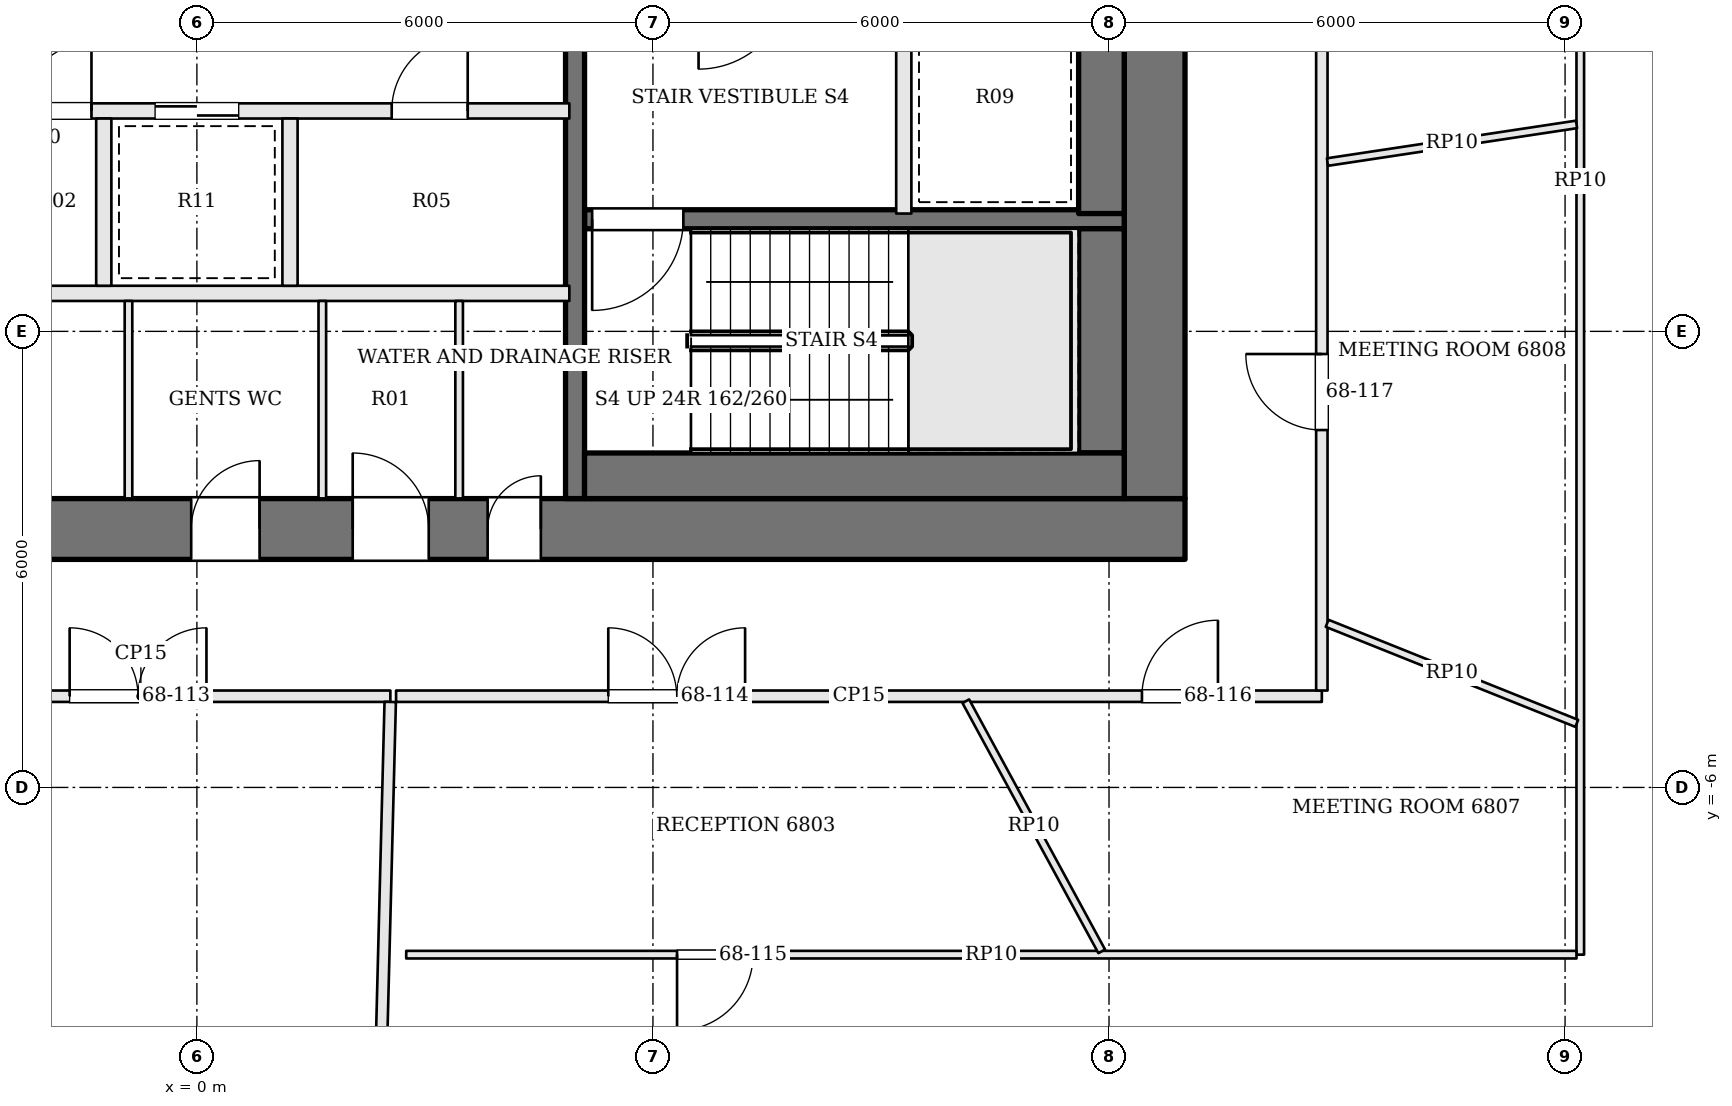
"""IFC4 building model, lengths in metres.
Left out: names, types, materials, properties, quantities, classifications, styles, units other than length and angle.
Written with IfcOpenShell. Run it as: python <this file> out.ifc"""

import sys

from ifc_helpers import new_model, si_unit, direction, frame, frame_2d, origin, place, context, subcontext, project, spatial, rectangle, extrude, element, fill, save


model = new_model("IFC4")
c1 = context("Model", 3, precision=1e-05, world=origin(), true_north=direction((0.0, 1.0)))
c2 = subcontext(c1, "Body", "Model", "MODEL_VIEW")
j1 = project(units=[si_unit("LENGTHUNIT", "METRE"), si_unit("PLANEANGLEUNIT", "RADIAN")], contexts=[c1])
p1 = place(None, origin())
s1 = spatial("IfcSite", under=j1, at=p1, CompositionType="ELEMENT")
p2 = place(p1, origin())
s2 = spatial("IfcBuilding", under=s1, at=p2, CompositionType="ELEMENT")
p3 = place(p2, frame((0.0, 0.0, 276.6)))
s3 = spatial("IfcBuildingStorey", under=s2, at=p3, CompositionType="ELEMENT", Elevation=276.6)
p4 = place(p3, frame((-13.0, -2.6, 0.0), z_axis=(0.0, 0.0, 1.0), x_axis=(1.0, 0.0, 0.0)))
e1 = element("IfcWall", 1, at=p4, inside=s3, PredefinedType="SHEAR", context=c2, shape_type="SweptSolid", body=[
    extrude(rectangle(XDim=26.0, YDim=0.8, at=frame_2d((13.0, 0.0))), origin(), (0.0, 0.0, 1.0), 3.9),
])
p5 = place(p4, frame((9.65, 0.0, 0.0)))
e2 = element("IfcOpeningElement", 2, at=p5, cuts=e1, PredefinedType="OPENING", context=c2, shape_type="SweptSolid", body=[
    extrude(rectangle(XDim=0.9, YDim=2.1, at=frame_2d((0.45, 1.05))), frame((0.0, 0.41, 0.0), z_axis=(0.0, -1.0, 0.0), x_axis=(1.0, 0.0, 0.0)), (0.0, 0.0, 1.0), 0.82),
])
p6 = place(p4, frame((12.925, 0.0, 0.0)))
e3 = element("IfcOpeningElement", 3, at=p6, cuts=e1, PredefinedType="OPENING", context=c2, shape_type="SweptSolid", body=[
    extrude(rectangle(XDim=0.9, YDim=2.1, at=frame_2d((0.45, 1.05))), frame((0.0, 0.41, 0.0), z_axis=(0.0, -1.0, 0.0), x_axis=(1.0, 0.0, 0.0)), (0.0, 0.0, 1.0), 0.82),
])
p7 = place(p4, frame((15.05, 0.0, 0.0)))
e4 = element("IfcOpeningElement", 4, at=p7, cuts=e1, PredefinedType="OPENING", context=c2, shape_type="SweptSolid", body=[
    extrude(rectangle(XDim=1.0, YDim=2.1, at=frame_2d((0.5, 1.05))), frame((0.0, 0.41, 0.0), z_axis=(0.0, -1.0, 0.0), x_axis=(1.0, 0.0, 0.0)), (0.0, 0.0, 1.0), 0.82),
])
p8 = place(p4, frame((16.825, 0.0, 0.0)))
e5 = element("IfcOpeningElement", 5, at=p8, cuts=e1, PredefinedType="OPENING", context=c2, shape_type="SweptSolid", body=[
    extrude(rectangle(XDim=0.7, YDim=2.1, at=frame_2d((0.35, 1.05))), frame((0.0, 0.41, 0.0), z_axis=(0.0, -1.0, 0.0), x_axis=(1.0, 0.0, 0.0)), (0.0, 0.0, 1.0), 0.82),
])
p9 = place(p3, frame((12.6, -2.2, 0.0), z_axis=(0.0, 0.0, 1.0), x_axis=(0.0, 1.0, 0.0)))
e6 = element("IfcWall", 6, at=p9, inside=s3, PredefinedType="SHEAR", context=c2, shape_type="SweptSolid", body=[
    extrude(rectangle(XDim=13.4, YDim=0.8, at=frame_2d((6.7, 0.0))), origin(), (0.0, 0.0, 1.0), 3.9),
])
p10 = place(p9, frame((7.4, 0.0, 0.0)))
e7 = element("IfcOpeningElement", 7, at=p10, cuts=e6, PredefinedType="OPENING", context=c2, shape_type="SweptSolid", body=[
    extrude(rectangle(XDim=1.8, YDim=2.1, at=frame_2d((0.9, 1.05))), frame((0.0, 0.41, 0.0), z_axis=(0.0, -1.0, 0.0), x_axis=(1.0, 0.0, 0.0)), (0.0, 0.0, 1.0), 0.82),
])
p11 = place(p3, frame((12.2, 1.475, 0.0), z_axis=(0.0, 0.0, 1.0), x_axis=(-1.0, 0.0, 0.0)))
e8 = element("IfcWall", 8, at=p11, inside=s3, PredefinedType="SOLIDWALL", context=c2, shape_type="SweptSolid", body=[
    extrude(rectangle(XDim=7.1, YDim=0.25, at=frame_2d((3.55, 0.0))), origin(), (0.0, 0.0, 1.0), 3.7),
])
p12 = place(p11, frame((5.8, 0.0, 0.0)))
e9 = element("IfcOpeningElement", 9, at=p12, cuts=e8, PredefinedType="OPENING", context=c2, shape_type="SweptSolid", body=[
    extrude(rectangle(XDim=1.2, YDim=2.1, at=frame_2d((0.6, 1.05))), frame((0.0, 0.135, 0.0), z_axis=(0.0, -1.0, 0.0), x_axis=(1.0, 0.0, 0.0)), (0.0, 0.0, 1.0), 0.27),
])
p13 = place(p3, frame((9.3, 4.55, 0.0), z_axis=(0.0, 0.0, 1.0), x_axis=(0.0, -1.0, 0.0)))
e10 = element("IfcWall", 10, at=p13, inside=s3, PredefinedType="SOLIDWALL", context=c2, shape_type="SweptSolid", body=[
    extrude(rectangle(XDim=3.0, YDim=0.2, at=frame_2d((1.5, 0.0))), origin(), (0.0, 0.0, 1.0), 3.7),
])
p14 = place(p3, frame((4.975, 11.2, 0.0), z_axis=(0.0, 0.0, 1.0), x_axis=(0.0, -1.0, 0.0)))
e11 = element("IfcWall", 11, at=p14, inside=s3, PredefinedType="SOLIDWALL", context=c2, shape_type="SweptSolid", body=[
    extrude(rectangle(XDim=13.4, YDim=0.25, at=frame_2d((6.7, 0.0))), origin(), (0.0, 0.0, 1.0), 3.7),
])
p15 = place(p14, frame((5.25, 0.0, 0.0)))
e12 = element("IfcOpeningElement", 12, at=p15, cuts=e11, PredefinedType="OPENING", context=c2, shape_type="SweptSolid", body=[
    extrude(rectangle(XDim=1.2, YDim=2.1, at=frame_2d((0.6, 1.05))), frame((0.0, 0.135, 0.0), z_axis=(0.0, -1.0, 0.0), x_axis=(1.0, 0.0, 0.0)), (0.0, 0.0, 1.0), 0.27),
])
p16 = place(p3, frame((11.9, 4.55, 0.0), z_axis=(0.0, 0.0, 1.0), x_axis=(0.0, -1.0, 0.0)))
e13 = element("IfcWall", 13, at=p16, inside=s3, PredefinedType="SOLIDWALL", context=c2, shape_type="SweptSolid", body=[
    extrude(rectangle(XDim=3.0, YDim=0.6, at=frame_2d((1.5, 0.0))), origin(), (0.0, 0.0, 1.0), 3.7),
])
p17 = place(p3, frame((11.9, 1.35, 0.0), z_axis=(0.0, 0.0, 1.0), x_axis=(0.0, -1.0, 0.0)))
e14 = element("IfcWall", 14, at=p17, inside=s3, PredefinedType="SOLIDWALL", context=c2, shape_type="SweptSolid", body=[
    extrude(rectangle(XDim=2.95, YDim=0.6, at=frame_2d((1.475, 0.0))), origin(), (0.0, 0.0, 1.0), 3.7),
])
p18 = place(p3, frame((12.2, -1.9, 0.0), z_axis=(0.0, 0.0, 1.0), x_axis=(-1.0, 0.0, 0.0)))
e15 = element("IfcWall", 15, at=p18, inside=s3, PredefinedType="SOLIDWALL", context=c2, shape_type="SweptSolid", body=[
    extrude(rectangle(XDim=7.1, YDim=0.6, at=frame_2d((3.55, 0.0))), origin(), (0.0, 0.0, 1.0), 3.7),
])
p19 = place(p3, frame((-4.9, 0.5, 0.0), z_axis=(0.0, 0.0, 1.0), x_axis=(1.0, 0.0, 0.0)))
e16 = element("IfcWall", 16, at=p19, inside=s3, PredefinedType="SOLIDWALL", context=c2, shape_type="SweptSolid", body=[
    extrude(rectangle(XDim=9.8, YDim=0.2, at=frame_2d((4.9, 0.0))), origin(), (0.0, 0.0, 1.0), 3.7),
])
p20 = place(p3, frame((-4.9, 2.9, 0.0), z_axis=(0.0, 0.0, 1.0), x_axis=(1.0, 0.0, 0.0)))
e17 = element("IfcWall", 17, at=p20, inside=s3, PredefinedType="SOLIDWALL", context=c2, shape_type="SweptSolid", body=[
    extrude(rectangle(XDim=9.8, YDim=0.2, at=frame_2d((4.9, 0.0))), origin(), (0.0, 0.0, 1.0), 3.7),
])
p21 = place(p20, frame((0.675, 0.0, 0.0)))
e18 = element("IfcOpeningElement", 18, at=p21, cuts=e17, PredefinedType="OPENING", context=c2, shape_type="SweptSolid", body=[
    extrude(rectangle(XDim=1.1, YDim=2.1, at=frame_2d((0.55, 1.05))), frame((0.0, 0.11, 0.0), z_axis=(0.0, -1.0, 0.0), x_axis=(1.0, 0.0, 0.0)), (0.0, 0.0, 1.0), 0.22),
])
p22 = place(p20, frame((2.613, 0.0, 0.0)))
e19 = element("IfcOpeningElement", 19, at=p22, cuts=e17, PredefinedType="OPENING", context=c2, shape_type="SweptSolid", body=[
    extrude(rectangle(XDim=0.9, YDim=2.1, at=frame_2d((0.45, 1.05))), frame((0.0, 0.11, 0.0), z_axis=(0.0, -1.0, 0.0), x_axis=(1.0, 0.0, 0.0)), (0.0, 0.0, 1.0), 0.22),
])
p23 = place(p20, frame((4.35, 0.0, 0.0)))
e20 = element("IfcOpeningElement", 20, at=p23, cuts=e17, PredefinedType="OPENING", context=c2, shape_type="SweptSolid", body=[
    extrude(rectangle(XDim=1.1, YDim=2.1, at=frame_2d((0.55, 1.05))), frame((0.0, 0.11, 0.0), z_axis=(0.0, -1.0, 0.0), x_axis=(1.0, 0.0, 0.0)), (0.0, 0.0, 1.0), 0.22),
])
p24 = place(p20, frame((7.463, 0.0, 0.0)))
e21 = element("IfcOpeningElement", 21, at=p24, cuts=e17, PredefinedType="OPENING", context=c2, shape_type="SweptSolid", body=[
    extrude(rectangle(XDim=1.0, YDim=2.1, at=frame_2d((0.5, 1.05))), frame((0.0, 0.11, 0.0), z_axis=(0.0, -1.0, 0.0), x_axis=(1.0, 0.0, 0.0)), (0.0, 0.0, 1.0), 0.22),
])
for number, where, z_axis, x_axis in (
    (22, (-1.225, 0.6, 0.0), (0.0, 0.0, 1.0), (0.0, 1.0, 0.0)),
    (23, (1.225, 0.6, 0.0), (0.0, 0.0, 1.0), (0.0, 1.0, 0.0)),
):
    element("IfcWall", number, at=place(p3, frame(where, z_axis=z_axis, x_axis=x_axis)), inside=s3, PredefinedType="SOLIDWALL", context=c2, shape_type="SweptSolid", body=[
        extrude(rectangle(XDim=2.2, YDim=0.2, at=frame_2d((1.1, 0.0))), origin(), (0.0, 0.0, 1.0), 3.7),
    ])
for number, where, z_axis, x_axis in (
    (24, (-0.9, -2.2, 0.0), (0.0, 0.0, 1.0), (0.0, 1.0, 0.0)),
    (25, (1.65, -2.2, 0.0), (0.0, 0.0, 1.0), (0.0, 1.0, 0.0)),
    (26, (3.45, -2.2, 0.0), (0.0, 0.0, 1.0), (0.0, 1.0, 0.0)),
):
    element("IfcWall", number, at=place(p3, frame(where, z_axis=z_axis, x_axis=x_axis)), inside=s3, PredefinedType="PARTITIONING", context=c2, shape_type="SweptSolid", body=[
        extrude(rectangle(XDim=2.6, YDim=0.1, at=frame_2d((1.3, 0.0))), origin(), (0.0, 0.0, 1.0), 3.7),
    ])
p25 = place(p3, frame((-4.019, -4.8, 0.0), z_axis=(0.0, 0.0, 1.0), x_axis=(1.0, 0.0, 0.0)))
e27 = element("IfcWall", 27, at=p25, inside=s3, PredefinedType="PARTITIONING", context=c2, shape_type="SweptSolid", body=[
    extrude(rectangle(XDim=6.565, YDim=0.15, at=frame_2d((3.282, 0.0))), origin(), (0.0, 0.0, 1.0), 3.198),
])
p26 = place(p25, frame((2.345, 0.0, 0.0)))
e28 = element("IfcOpeningElement", 28, at=p26, cuts=e27, PredefinedType="OPENING", context=c2, shape_type="SweptSolid", body=[
    extrude(rectangle(XDim=1.8, YDim=2.1, at=frame_2d((0.9, 1.05))), frame((0.0, 0.085, 0.0), z_axis=(0.0, -1.0, 0.0), x_axis=(1.0, 0.0, 0.0)), (0.0, 0.0, 1.0), 0.17),
])
p27 = place(p3, frame((2.299, -14.454, 0.0), z_axis=(0.0, 0.0, 1.0), x_axis=(0.025556211624, 0.999673386686, 0.0)))
e29 = element("IfcWall", 29, at=p27, inside=s3, PredefinedType="PARTITIONING", context=c2, shape_type="SweptSolid", body=[
    extrude(rectangle(XDim=9.582, YDim=0.15, at=frame_2d((4.791, 0.0))), origin(), (0.0, 0.0, 1.0), 3.184),
])
p28 = place(p3, frame((2.62, -4.8, 0.0), z_axis=(0.0, 0.0, 1.0), x_axis=(1.0, 0.0, 0.0)))
e30 = element("IfcWall", 30, at=p28, inside=s3, PredefinedType="PARTITIONING", context=c2, shape_type="SweptSolid", body=[
    extrude(rectangle(XDim=12.18, YDim=0.15, at=frame_2d((6.09, 0.0))), origin(), (0.0, 0.0, 1.0), 3.198),
])
p29 = place(p28, frame((2.792, 0.0, 0.0)))
e31 = element("IfcOpeningElement", 31, at=p29, cuts=e30, PredefinedType="OPENING", context=c2, shape_type="SweptSolid", body=[
    extrude(rectangle(XDim=1.8, YDim=2.1, at=frame_2d((0.9, 1.05))), frame((0.0, 0.085, 0.0), z_axis=(0.0, -1.0, 0.0), x_axis=(1.0, 0.0, 0.0)), (0.0, 0.0, 1.0), 0.17),
])
p30 = place(p28, frame((9.813, 0.0, 0.0)))
e32 = element("IfcOpeningElement", 32, at=p30, cuts=e30, PredefinedType="OPENING", context=c2, shape_type="SweptSolid", body=[
    extrude(rectangle(XDim=1.0, YDim=2.4, at=frame_2d((0.5, 1.2))), frame((0.0, 0.085, 0.0), z_axis=(0.0, -1.0, 0.0), x_axis=(1.0, 0.0, 0.0)), (0.0, 0.0, 1.0), 0.17),
])
p31 = place(p3, frame((14.8, -4.725, 0.0), z_axis=(0.0, 0.0, 1.0), x_axis=(0.0, 1.0, 0.0)))
e33 = element("IfcWall", 33, at=p31, inside=s3, PredefinedType="PARTITIONING", context=c2, shape_type="SweptSolid", body=[
    extrude(rectangle(XDim=17.197, YDim=0.15, at=frame_2d((8.598, 0.0))), origin(), (0.0, 0.0, 1.0), 3.198),
])
p32 = place(p31, frame((3.427, 0.0, 0.0)))
e34 = element("IfcOpeningElement", 34, at=p32, cuts=e33, PredefinedType="OPENING", context=c2, shape_type="SweptSolid", body=[
    extrude(rectangle(XDim=1.0, YDim=2.4, at=frame_2d((0.5, 1.2))), frame((0.0, 0.085, 0.0), z_axis=(0.0, -1.0, 0.0), x_axis=(1.0, 0.0, 0.0)), (0.0, 0.0, 1.0), 0.17),
])
p33 = place(p31, frame((9.431, 0.0, 0.0)))
e35 = element("IfcOpeningElement", 35, at=p33, cuts=e33, PredefinedType="OPENING", context=c2, shape_type="SweptSolid", body=[
    extrude(rectangle(XDim=1.0, YDim=2.4, at=frame_2d((0.5, 1.2))), frame((0.0, 0.085, 0.0), z_axis=(0.0, -1.0, 0.0), x_axis=(1.0, 0.0, 0.0)), (0.0, 0.0, 1.0), 0.17),
])
p34 = place(p3, frame((18.2, 12.158, 0.0), z_axis=(0.0, 0.0, 1.0), x_axis=(0.0, -1.0, 0.0)))
e36 = element("IfcWall", 36, at=p34, inside=s3, PredefinedType="PARTITIONING", context=c2, shape_type="SweptSolid", body=[
    extrude(rectangle(XDim=20.358, YDim=0.1, at=frame_2d((10.179, 0.0))), origin(), (0.0, 0.0, 1.0), 3.184),
])
p35 = place(p3, frame((18.15, -8.2, 0.0), z_axis=(0.0, 0.0, 1.0), x_axis=(-1.0, 0.0, 0.0)))
e37 = element("IfcWall", 37, at=p35, inside=s3, PredefinedType="PARTITIONING", context=c2, shape_type="SweptSolid", body=[
    extrude(rectangle(XDim=15.396, YDim=0.1, at=frame_2d((7.698, 0.0))), origin(), (0.0, 0.0, 1.0), 3.184),
])
p36 = place(p35, frame((10.833, 0.0, 0.0)))
e38 = element("IfcOpeningElement", 38, at=p36, cuts=e37, PredefinedType="OPENING", context=c2, shape_type="SweptSolid", body=[
    extrude(rectangle(XDim=1.0, YDim=2.1, at=frame_2d((0.5, 1.05))), frame((0.0, 0.06, 0.0), z_axis=(0.0, -1.0, 0.0), x_axis=(1.0, 0.0, 0.0)), (0.0, 0.0, 1.0), 0.12),
])
p37 = place(p3, frame((10.116, -4.866, 0.0), z_axis=(0.0, 0.0, 1.0), x_axis=(0.477517697146, -0.878622130903, 0.0)))
e39 = element("IfcWall", 39, at=p37, inside=s3, PredefinedType="PARTITIONING", context=c2, shape_type="SweptSolid", body=[
    extrude(rectangle(XDim=3.745, YDim=0.1, at=frame_2d((1.872, 0.0))), origin(), (0.0, 0.0, 1.0), 3.184),
])
p38 = place(p3, frame((14.87, -3.841, 0.0), z_axis=(0.0, 0.0, 1.0), x_axis=(0.928248069679, -0.371961719989, 0.0)))
e40 = element("IfcWall", 40, at=p38, inside=s3, PredefinedType="PARTITIONING", context=c2, shape_type="SweptSolid", body=[
    extrude(rectangle(XDim=3.538, YDim=0.1, at=frame_2d((1.769, 0.0))), origin(), (0.0, 0.0, 1.0), 3.184),
])
p39 = place(p3, frame((14.874, 2.228, 0.0), z_axis=(0.0, 0.0, 1.0), x_axis=(0.988773632129, 0.149421231442, 0.0)))
e41 = element("IfcWall", 41, at=p39, inside=s3, PredefinedType="PARTITIONING", context=c2, shape_type="SweptSolid", body=[
    extrude(rectangle(XDim=3.313, YDim=0.1, at=frame_2d((1.657, 0.0))), origin(), (0.0, 0.0, 1.0), 3.184),
])
p40 = place(p12, origin())
e42 = element("IfcDoor", 42, at=p40, inside=s3, OperationType="SINGLE_SWING_RIGHT", PredefinedType="DOOR", context=c2, shape_type="SweptSolid", body=[
    extrude(rectangle(XDim=1.2, YDim=2.1, at=frame_2d((0.6, 1.05))), frame((0.0, 0.025, 0.0), z_axis=(0.0, -1.0, 0.0), x_axis=(1.0, 0.0, 0.0)), (0.0, 0.0, 1.0), 0.05),
])
fill(e9, e42)
p41 = place(p22, origin())
e43 = element("IfcDoor", 43, at=p41, inside=s3, OperationType="SINGLE_SWING_RIGHT", PredefinedType="DOOR", context=c2, shape_type="SweptSolid", body=[
    extrude(rectangle(XDim=0.9, YDim=2.1, at=frame_2d((0.45, 1.05))), frame((0.0, 0.025, 0.0), z_axis=(0.0, -1.0, 0.0), x_axis=(1.0, 0.0, 0.0)), (0.0, 0.0, 1.0), 0.05),
])
fill(e19, e43)
p42 = place(p23, origin())
e44 = element("IfcDoor", 44, at=p42, inside=s3, OperationType="SLIDING_TO_LEFT", PredefinedType="DOOR", context=c2, shape_type="SweptSolid", body=[
    extrude(rectangle(XDim=1.1, YDim=2.1, at=frame_2d((0.55, 1.05))), frame((0.0, 0.025, 0.0), z_axis=(0.0, -1.0, 0.0), x_axis=(1.0, 0.0, 0.0)), (0.0, 0.0, 1.0), 0.05),
])
fill(e20, e44)
p43 = place(p24, origin())
e45 = element("IfcDoor", 45, at=p43, inside=s3, OperationType="SINGLE_SWING_RIGHT", PredefinedType="DOOR", context=c2, shape_type="SweptSolid", body=[
    extrude(rectangle(XDim=1.0, YDim=2.1, at=frame_2d((0.5, 1.05))), frame((0.0, 0.025, 0.0), z_axis=(0.0, -1.0, 0.0), x_axis=(1.0, 0.0, 0.0)), (0.0, 0.0, 1.0), 0.05),
])
fill(e21, e45)
p44 = place(p6, origin())
e46 = element("IfcDoor", 46, at=p44, inside=s3, OperationType="SINGLE_SWING_RIGHT", PredefinedType="DOOR", context=c2, shape_type="SweptSolid", body=[
    extrude(rectangle(XDim=0.9, YDim=2.1, at=frame_2d((0.45, 1.05))), frame((0.0, 0.025, 0.0), z_axis=(0.0, -1.0, 0.0), x_axis=(1.0, 0.0, 0.0)), (0.0, 0.0, 1.0), 0.05),
])
fill(e3, e46)
p45 = place(p7, origin())
e47 = element("IfcDoor", 47, at=p45, inside=s3, OperationType="SINGLE_SWING_LEFT", PredefinedType="DOOR", context=c2, shape_type="SweptSolid", body=[
    extrude(rectangle(XDim=1.0, YDim=2.1, at=frame_2d((0.5, 1.05))), frame((0.0, 0.025, 0.0), z_axis=(0.0, -1.0, 0.0), x_axis=(1.0, 0.0, 0.0)), (0.0, 0.0, 1.0), 0.05),
])
fill(e4, e47)
p46 = place(p8, origin())
e48 = element("IfcDoor", 48, at=p46, inside=s3, OperationType="SINGLE_SWING_RIGHT", PredefinedType="DOOR", context=c2, shape_type="SweptSolid", body=[
    extrude(rectangle(XDim=0.7, YDim=2.1, at=frame_2d((0.35, 1.05))), frame((0.0, 0.025, 0.0), z_axis=(0.0, -1.0, 0.0), x_axis=(1.0, 0.0, 0.0)), (0.0, 0.0, 1.0), 0.05),
])
fill(e5, e48)
p47 = place(p26, origin())
e49 = element("IfcDoor", 49, at=p47, inside=s3, OperationType="DOUBLE_DOOR_SINGLE_SWING", PredefinedType="DOOR", context=c2, shape_type="SweptSolid", body=[
    extrude(rectangle(XDim=1.8, YDim=2.1, at=frame_2d((0.9, 1.05))), frame((0.0, 0.025, 0.0), z_axis=(0.0, -1.0, 0.0), x_axis=(1.0, 0.0, 0.0)), (0.0, 0.0, 1.0), 0.05),
])
fill(e28, e49)
p48 = place(p29, origin())
e50 = element("IfcDoor", 50, at=p48, inside=s3, OperationType="DOUBLE_DOOR_SINGLE_SWING", PredefinedType="DOOR", context=c2, shape_type="SweptSolid", body=[
    extrude(rectangle(XDim=1.8, YDim=2.1, at=frame_2d((0.9, 1.05))), frame((0.0, 0.025, 0.0), z_axis=(0.0, -1.0, 0.0), x_axis=(1.0, 0.0, 0.0)), (0.0, 0.0, 1.0), 0.05),
])
fill(e31, e50)
p49 = place(p36, origin())
e51 = element("IfcDoor", 51, at=p49, inside=s3, OperationType="SINGLE_SWING_RIGHT", PredefinedType="DOOR", context=c2, shape_type="SweptSolid", body=[
    extrude(rectangle(XDim=1.0, YDim=2.1, at=frame_2d((0.5, 1.05))), frame((0.0, 0.025, 0.0), z_axis=(0.0, -1.0, 0.0), x_axis=(1.0, 0.0, 0.0)), (0.0, 0.0, 1.0), 0.05),
])
fill(e38, e51)
p50 = place(p30, origin())
e52 = element("IfcDoor", 52, at=p50, inside=s3, OperationType="SINGLE_SWING_RIGHT", PredefinedType="DOOR", context=c2, shape_type="SweptSolid", body=[
    extrude(rectangle(XDim=1.0, YDim=2.4, at=frame_2d((0.5, 1.2))), frame((0.0, 0.025, 0.0), z_axis=(0.0, -1.0, 0.0), x_axis=(1.0, 0.0, 0.0)), (0.0, 0.0, 1.0), 0.05),
])
fill(e32, e52)
p51 = place(p32, origin())
e53 = element("IfcDoor", 53, at=p51, inside=s3, OperationType="SINGLE_SWING_RIGHT", PredefinedType="DOOR", context=c2, shape_type="SweptSolid", body=[
    extrude(rectangle(XDim=1.0, YDim=2.4, at=frame_2d((0.5, 1.2))), frame((0.0, 0.025, 0.0), z_axis=(0.0, -1.0, 0.0), x_axis=(1.0, 0.0, 0.0)), (0.0, 0.0, 1.0), 0.05),
])
fill(e34, e53)
save(model, sys.argv[1])
